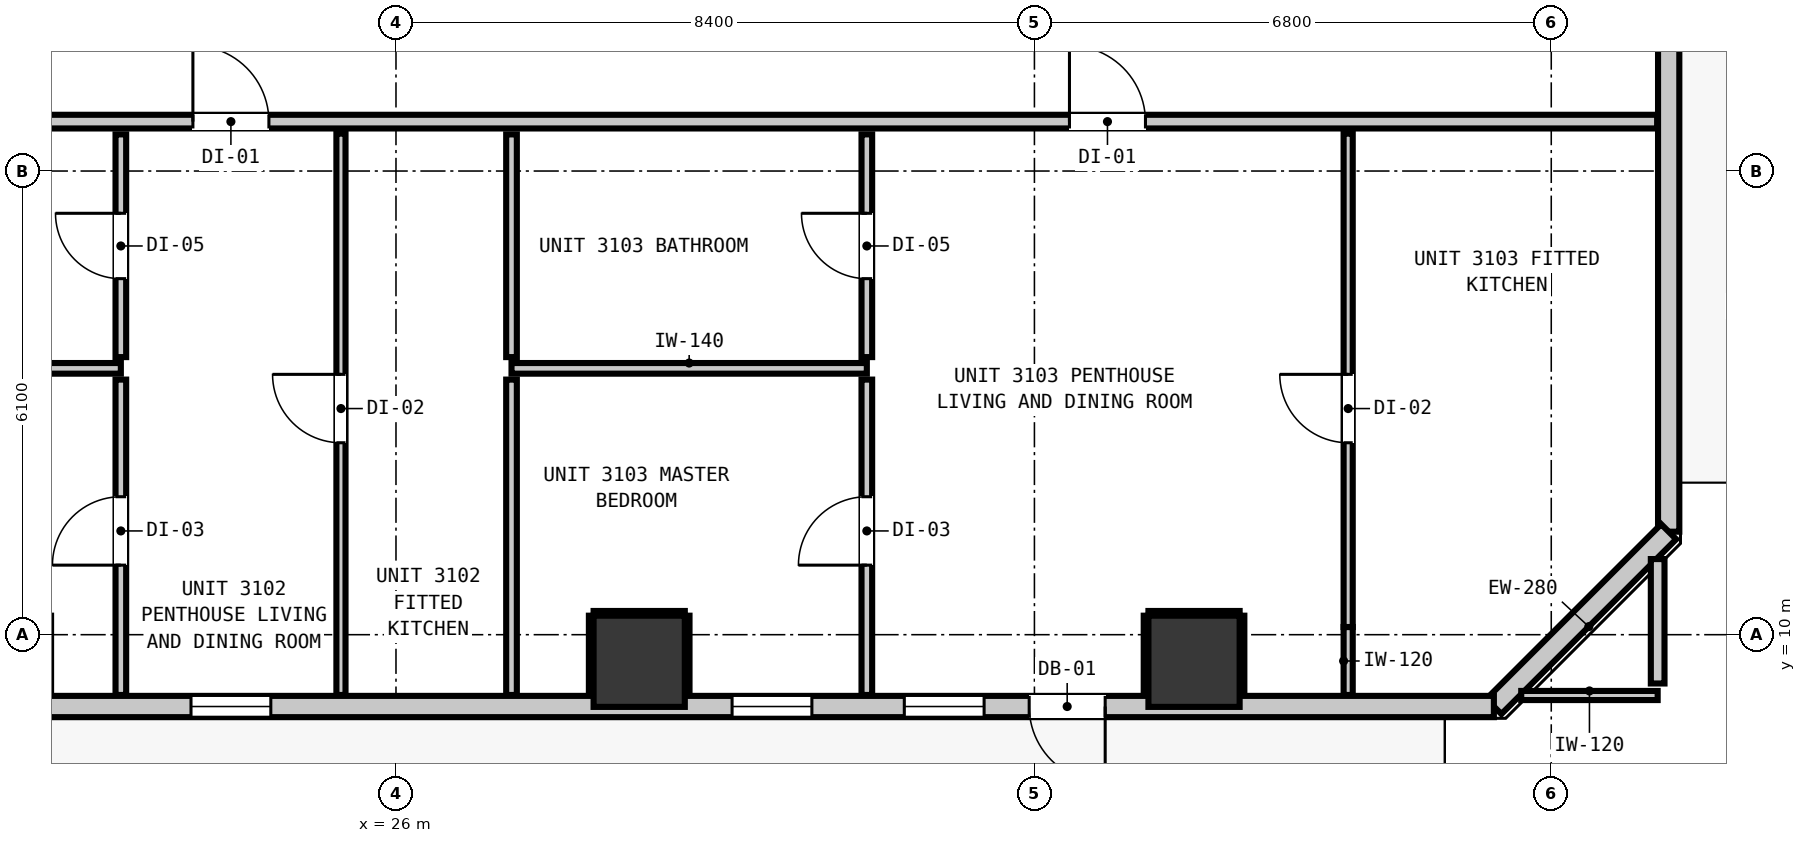
"""IFC4 building model, lengths in metres.
Left out: names, types, materials, properties, quantities, classifications, styles, units other than length and angle.
Written with IfcOpenShell. Run it as: python <this file> out.ifc"""

import sys

from ifc_helpers import new_model, si_unit, direction, frame, frame_2d, origin, origin_2d, place, context, subcontext, project, spatial, rectangle, extrude, element, fill, save


model = new_model("IFC4")
c1 = context("Model", 3, precision=1e-05, world=origin(), true_north=direction((0.0, 1.0)))
c2 = subcontext(c1, "Body", "Model", "MODEL_VIEW")
j1 = project(units=[si_unit("LENGTHUNIT", "METRE"), si_unit("PLANEANGLEUNIT", "RADIAN")], contexts=[c1])
p1 = place(None, origin())
s1 = spatial("IfcSite", under=j1, at=p1, CompositionType="ELEMENT")
p2 = place(p1, origin())
s2 = spatial("IfcBuilding", under=s1, at=p2, CompositionType="ELEMENT")
p3 = place(p2, frame((0.0, 0.0, 109.4)))
s3 = spatial("IfcBuildingStorey", under=s2, at=p3, CompositionType="ELEMENT", Elevation=109.4)
for number, where, z_axis, x_axis in (
    (1, (29.2, 9.65, 0.0), (0.0, 0.0, 1.0), (1.0, 0.0, 0.0)),
    (2, (36.5, 9.65, 0.0), (0.0, 0.0, 1.0), (1.0, 0.0, 0.0)),
):
    element("IfcColumn", number, at=place(p3, frame(where, z_axis=z_axis, x_axis=x_axis)), inside=s3, PredefinedType="COLUMN", context=c2, shape_type="SweptSolid", body=[
        extrude(rectangle(XDim=1.2, YDim=1.2, at=origin_2d()), origin(), (0.0, 0.0, 1.0), 3.32),
    ])
p4 = place(p3, frame((42.745, 43.645, 0.0), z_axis=(0.0, 0.0, 1.0), x_axis=(0.0, -1.0, 0.0)))
e3 = element("IfcWall", 3, at=p4, inside=s3, PredefinedType="STANDARD", context=c2, shape_type="SweptSolid", body=[
    extrude(rectangle(XDim=32.29, YDim=0.28, at=frame_2d((16.145, 0.0))), origin(), (0.0, 0.0, 1.0), 3.08),
])
p5 = place(p4, frame((6.871, 0.0, 0.0)))
e4 = element("IfcOpeningElement", 4, at=p5, cuts=e3, PredefinedType="OPENING", context=c2, shape_type="SweptSolid", body=[
    extrude(rectangle(XDim=1.0, YDim=2.15, at=frame_2d((0.5, 1.075))), frame((0.0, 0.15, 0.0), z_axis=(0.0, -1.0, 0.0), x_axis=(1.0, 0.0, 0.0)), (0.0, 0.0, 1.0), 0.3),
])
p6 = place(p4, frame((0.318, 0.0, 0.85)))
e5 = element("IfcOpeningElement", 5, at=p6, cuts=e3, PredefinedType="OPENING", context=c2, shape_type="SweptSolid", body=[
    extrude(rectangle(XDim=1.05, YDim=1.65, at=frame_2d((0.525, 0.825))), frame((0.0, 0.15, 0.0), z_axis=(0.0, -1.0, 0.0), x_axis=(1.0, 0.0, 0.0)), (0.0, 0.0, 1.0), 0.3),
])
p7 = place(p4, frame((16.37, 0.0, 0.85)))
e6 = element("IfcOpeningElement", 6, at=p7, cuts=e3, PredefinedType="OPENING", context=c2, shape_type="SweptSolid", body=[
    extrude(rectangle(XDim=2.7, YDim=2.0, at=frame_2d((1.35, 1.0))), frame((0.0, 0.15, 0.0), z_axis=(0.0, -1.0, 0.0), x_axis=(1.0, 0.0, 0.0)), (0.0, 0.0, 1.0), 0.3),
])
p8 = place(p4, frame((8.452, 0.0, 0.85)))
e7 = element("IfcOpeningElement", 7, at=p8, cuts=e3, PredefinedType="OPENING", context=c2, shape_type="SweptSolid", body=[
    extrude(rectangle(XDim=1.05, YDim=1.65, at=frame_2d((0.525, 0.825))), frame((0.0, 0.15, 0.0), z_axis=(0.0, -1.0, 0.0), x_axis=(1.0, 0.0, 0.0)), (0.0, 0.0, 1.0), 0.3),
])
p9 = place(p3, frame((42.745, 11.355, 0.0), z_axis=(0.0, 0.0, 1.0), x_axis=(-0.707106781187, -0.707106781187, 0.0)))
e8 = element("IfcWall", 8, at=p9, inside=s3, PredefinedType="STANDARD", context=c2, shape_type="SweptSolid", body=[
    extrude(rectangle(XDim=3.253, YDim=0.28, at=frame_2d((1.626, 0.0))), origin(), (0.0, 0.0, 1.0), 3.08),
])
p10 = place(p3, frame((40.445, 9.055, 0.0), z_axis=(0.0, 0.0, 1.0), x_axis=(-1.0, 0.0, 0.0)))
e9 = element("IfcWall", 9, at=p10, inside=s3, PredefinedType="STANDARD", context=c2, shape_type="SweptSolid", body=[
    extrude(rectangle(XDim=35.09, YDim=0.28, at=frame_2d((17.545, 0.0))), origin(), (0.0, 0.0, 1.0), 3.08),
])
p11 = place(p10, frame((5.114, 0.0, 0.0)))
e10 = element("IfcOpeningElement", 10, at=p11, cuts=e9, PredefinedType="OPENING", context=c2, shape_type="SweptSolid", body=[
    extrude(rectangle(XDim=1.0, YDim=2.15, at=frame_2d((0.5, 1.075))), frame((0.0, 0.15, 0.0), z_axis=(0.0, -1.0, 0.0), x_axis=(1.0, 0.0, 0.0)), (0.0, 0.0, 1.0), 0.3),
])
p12 = place(p10, frame((29.53, 0.0, 0.85)))
e11 = element("IfcOpeningElement", 11, at=p12, cuts=e9, PredefinedType="OPENING", context=c2, shape_type="SweptSolid", body=[
    extrude(rectangle(XDim=2.7, YDim=2.0, at=frame_2d((1.35, 1.0))), frame((0.0, 0.15, 0.0), z_axis=(0.0, -1.0, 0.0), x_axis=(1.0, 0.0, 0.0)), (0.0, 0.0, 1.0), 0.3),
])
p13 = place(p10, frame((33.593, 0.0, 0.85)))
e12 = element("IfcOpeningElement", 12, at=p13, cuts=e9, PredefinedType="OPENING", context=c2, shape_type="SweptSolid", body=[
    extrude(rectangle(XDim=1.05, YDim=1.65, at=frame_2d((0.525, 0.825))), frame((0.0, 0.15, 0.0), z_axis=(0.0, -1.0, 0.0), x_axis=(1.0, 0.0, 0.0)), (0.0, 0.0, 1.0), 0.3),
])
p14 = place(p10, frame((16.092, 0.0, 0.85)))
e13 = element("IfcOpeningElement", 13, at=p14, cuts=e9, PredefinedType="OPENING", context=c2, shape_type="SweptSolid", body=[
    extrude(rectangle(XDim=1.05, YDim=1.65, at=frame_2d((0.525, 0.825))), frame((0.0, 0.15, 0.0), z_axis=(0.0, -1.0, 0.0), x_axis=(1.0, 0.0, 0.0)), (0.0, 0.0, 1.0), 0.3),
])
p15 = place(p10, frame((20.718, 0.0, 0.85)))
e14 = element("IfcOpeningElement", 14, at=p15, cuts=e9, PredefinedType="OPENING", context=c2, shape_type="SweptSolid", body=[
    extrude(rectangle(XDim=2.7, YDim=2.0, at=frame_2d((1.35, 1.0))), frame((0.0, 0.15, 0.0), z_axis=(0.0, -1.0, 0.0), x_axis=(1.0, 0.0, 0.0)), (0.0, 0.0, 1.0), 0.3),
])
p16 = place(p10, frame((6.707, 0.0, 0.85)))
e15 = element("IfcOpeningElement", 15, at=p16, cuts=e9, PredefinedType="OPENING", context=c2, shape_type="SweptSolid", body=[
    extrude(rectangle(XDim=1.05, YDim=1.65, at=frame_2d((0.525, 0.825))), frame((0.0, 0.15, 0.0), z_axis=(0.0, -1.0, 0.0), x_axis=(1.0, 0.0, 0.0)), (0.0, 0.0, 1.0), 0.3),
])
p17 = place(p10, frame((8.973, 0.0, 0.85)))
e16 = element("IfcOpeningElement", 16, at=p17, cuts=e9, PredefinedType="OPENING", context=c2, shape_type="SweptSolid", body=[
    extrude(rectangle(XDim=1.05, YDim=1.65, at=frame_2d((0.525, 0.825))), frame((0.0, 0.15, 0.0), z_axis=(0.0, -1.0, 0.0), x_axis=(1.0, 0.0, 0.0)), (0.0, 0.0, 1.0), 0.3),
])
p18 = place(p3, frame((3.207, 16.75, 0.0), z_axis=(0.0, 0.0, 1.0), x_axis=(1.0, 0.0, 0.0)))
e17 = element("IfcWall", 17, at=p18, inside=s3, PredefinedType="PARTITIONING", context=c2, shape_type="SweptSolid", body=[
    extrude(rectangle(XDim=39.386, YDim=0.18, at=frame_2d((19.693, 0.0))), origin(), (0.0, 0.0, 1.0), 3.08),
])
p19 = place(p18, frame((5.858, 0.0, 0.0)))
e18 = element("IfcOpeningElement", 18, at=p19, cuts=e17, PredefinedType="OPENING", context=c2, shape_type="SweptSolid", body=[
    extrude(rectangle(XDim=1.0, YDim=2.15, at=frame_2d((0.5, 1.075))), frame((0.0, 0.1, 0.0), z_axis=(0.0, -1.0, 0.0), x_axis=(1.0, 0.0, 0.0)), (0.0, 0.0, 1.0), 0.2),
])
p20 = place(p18, frame((20.121, 0.0, 0.0)))
e19 = element("IfcOpeningElement", 19, at=p20, cuts=e17, PredefinedType="OPENING", context=c2, shape_type="SweptSolid", body=[
    extrude(rectangle(XDim=1.0, YDim=2.15, at=frame_2d((0.5, 1.075))), frame((0.0, 0.1, 0.0), z_axis=(0.0, -1.0, 0.0), x_axis=(1.0, 0.0, 0.0)), (0.0, 0.0, 1.0), 0.2),
])
p21 = place(p18, frame((31.654, 0.0, 0.0)))
e20 = element("IfcOpeningElement", 20, at=p21, cuts=e17, PredefinedType="OPENING", context=c2, shape_type="SweptSolid", body=[
    extrude(rectangle(XDim=1.0, YDim=2.15, at=frame_2d((0.5, 1.075))), frame((0.0, 0.1, 0.0), z_axis=(0.0, -1.0, 0.0), x_axis=(1.0, 0.0, 0.0)), (0.0, 0.0, 1.0), 0.2),
])
p22 = place(p3, frame((16.454, 13.504, 0.0), z_axis=(0.0, 0.0, 1.0), x_axis=(1.0, 0.0, 0.0)))
e21 = element("IfcWall", 21, at=p22, inside=s3, PredefinedType="PARTITIONING", context=c2, shape_type="SweptSolid", body=[
    extrude(rectangle(XDim=5.926, YDim=0.14, at=frame_2d((2.963, 0.0))), origin(), (0.0, 0.0, 1.0), 3.08),
])
p23 = place(p3, frame((27.52, 13.504, 0.0), z_axis=(0.0, 0.0, 1.0), x_axis=(1.0, 0.0, 0.0)))
e22 = element("IfcWall", 22, at=p23, inside=s3, PredefinedType="PARTITIONING", context=c2, shape_type="SweptSolid", body=[
    extrude(rectangle(XDim=4.675, YDim=0.14, at=frame_2d((2.337, 0.0))), origin(), (0.0, 0.0, 1.0), 3.08),
])
p24 = place(p3, frame((40.805, 9.2, 0.0), z_axis=(0.0, 0.0, 1.0), x_axis=(1.0, 0.0, 0.0)))
e23 = element("IfcWall", 23, at=p24, inside=s3, PredefinedType="PARTITIONING", context=c2, shape_type="SweptSolid", body=[
    extrude(rectangle(XDim=1.795, YDim=0.12, at=frame_2d((0.897, 0.0))), origin(), (0.0, 0.0, 1.0), 3.08),
])
p25 = place(p3, frame((42.6, 9.358, 0.0), z_axis=(0.0, 0.0, 1.0), x_axis=(0.0, 1.0, 0.0)))
e24 = element("IfcWall", 24, at=p25, inside=s3, PredefinedType="PARTITIONING", context=c2, shape_type="SweptSolid", body=[
    extrude(rectangle(XDim=1.637, YDim=0.18, at=frame_2d((0.819, 0.0))), origin(), (0.0, 0.0, 1.0), 3.08),
])
p26 = place(p3, frame((22.38, 9.207, 0.0), z_axis=(0.0, 0.0, 1.0), x_axis=(0.0, 1.0, 0.0)))
e25 = element("IfcWall", 25, at=p26, inside=s3, PredefinedType="PARTITIONING", context=c2, shape_type="SweptSolid", body=[
    extrude(rectangle(XDim=4.149, YDim=0.14, at=frame_2d((2.074, 0.0))), origin(), (0.0, 0.0, 1.0), 3.08),
])
p27 = place(p26, frame((1.708, 0.0, 0.0)))
e26 = element("IfcOpeningElement", 26, at=p27, cuts=e25, PredefinedType="OPENING", context=c2, shape_type="SweptSolid", body=[
    extrude(rectangle(XDim=0.9, YDim=2.1, at=frame_2d((0.45, 1.05))), frame((0.0, 0.08, 0.0), z_axis=(0.0, -1.0, 0.0), x_axis=(1.0, 0.0, 0.0)), (0.0, 0.0, 1.0), 0.16),
])
p28 = place(p3, frame((22.38, 13.652, 0.0), z_axis=(0.0, 0.0, 1.0), x_axis=(0.0, 1.0, 0.0)))
e27 = element("IfcWall", 27, at=p28, inside=s3, PredefinedType="PARTITIONING", context=c2, shape_type="SweptSolid", body=[
    extrude(rectangle(XDim=2.93, YDim=0.14, at=frame_2d((1.465, 0.0))), origin(), (0.0, 0.0, 1.0), 3.08),
])
p29 = place(p28, frame((1.032, 0.0, 0.0)))
e28 = element("IfcOpeningElement", 28, at=p29, cuts=e27, PredefinedType="OPENING", context=c2, shape_type="SweptSolid", body=[
    extrude(rectangle(XDim=0.86, YDim=2.02, at=frame_2d((0.43, 1.01))), frame((0.0, 0.08, 0.0), z_axis=(0.0, -1.0, 0.0), x_axis=(1.0, 0.0, 0.0)), (0.0, 0.0, 1.0), 0.16),
])
p30 = place(p3, frame((27.52, 9.207, 0.0), z_axis=(0.0, 0.0, 1.0), x_axis=(0.0, 1.0, 0.0)))
e29 = element("IfcWall", 29, at=p30, inside=s3, PredefinedType="PARTITIONING", context=c2, shape_type="SweptSolid", body=[
    extrude(rectangle(XDim=4.149, YDim=0.14, at=frame_2d((2.074, 0.0))), origin(), (0.0, 0.0, 1.0), 3.08),
])
p31 = place(p3, frame((27.52, 13.652, 0.0), z_axis=(0.0, 0.0, 1.0), x_axis=(0.0, 1.0, 0.0)))
e30 = element("IfcWall", 30, at=p31, inside=s3, PredefinedType="PARTITIONING", context=c2, shape_type="SweptSolid", body=[
    extrude(rectangle(XDim=2.93, YDim=0.14, at=frame_2d((1.465, 0.0))), origin(), (0.0, 0.0, 1.0), 3.08),
])
p32 = place(p3, frame((32.195, 9.207, 0.0), z_axis=(0.0, 0.0, 1.0), x_axis=(0.0, 1.0, 0.0)))
e31 = element("IfcWall", 31, at=p32, inside=s3, PredefinedType="PARTITIONING", context=c2, shape_type="SweptSolid", body=[
    extrude(rectangle(XDim=4.149, YDim=0.14, at=frame_2d((2.074, 0.0))), origin(), (0.0, 0.0, 1.0), 3.08),
])
p33 = place(p32, frame((1.708, 0.0, 0.0)))
e32 = element("IfcOpeningElement", 32, at=p33, cuts=e31, PredefinedType="OPENING", context=c2, shape_type="SweptSolid", body=[
    extrude(rectangle(XDim=0.9, YDim=2.1, at=frame_2d((0.45, 1.05))), frame((0.0, 0.08, 0.0), z_axis=(0.0, -1.0, 0.0), x_axis=(1.0, 0.0, 0.0)), (0.0, 0.0, 1.0), 0.16),
])
p34 = place(p3, frame((32.195, 13.652, 0.0), z_axis=(0.0, 0.0, 1.0), x_axis=(0.0, 1.0, 0.0)))
e33 = element("IfcWall", 33, at=p34, inside=s3, PredefinedType="PARTITIONING", context=c2, shape_type="SweptSolid", body=[
    extrude(rectangle(XDim=2.93, YDim=0.14, at=frame_2d((1.465, 0.0))), origin(), (0.0, 0.0, 1.0), 3.08),
])
p35 = place(p34, frame((1.032, 0.0, 0.0)))
e34 = element("IfcOpeningElement", 34, at=p35, cuts=e33, PredefinedType="OPENING", context=c2, shape_type="SweptSolid", body=[
    extrude(rectangle(XDim=0.86, YDim=2.02, at=frame_2d((0.43, 1.01))), frame((0.0, 0.08, 0.0), z_axis=(0.0, -1.0, 0.0), x_axis=(1.0, 0.0, 0.0)), (0.0, 0.0, 1.0), 0.16),
])
p36 = place(p3, frame((25.276, 9.207, 0.0), z_axis=(0.0, 0.0, 1.0), x_axis=(0.0, 1.0, 0.0)))
e35 = element("IfcWall", 35, at=p36, inside=s3, PredefinedType="PARTITIONING", context=c2, shape_type="SweptSolid", body=[
    extrude(rectangle(XDim=7.385, YDim=0.12, at=frame_2d((3.692, 0.0))), origin(), (0.0, 0.0, 1.0), 3.08),
])
p37 = place(p36, frame((3.318, 0.0, 0.0)))
e36 = element("IfcOpeningElement", 36, at=p37, cuts=e35, PredefinedType="OPENING", context=c2, shape_type="SweptSolid", body=[
    extrude(rectangle(XDim=0.9, YDim=2.1, at=frame_2d((0.45, 1.05))), frame((0.0, 0.07, 0.0), z_axis=(0.0, -1.0, 0.0), x_axis=(1.0, 0.0, 0.0)), (0.0, 0.0, 1.0), 0.14),
])
p38 = place(p3, frame((38.528, 9.207, 0.0), z_axis=(0.0, 0.0, 1.0), x_axis=(0.0, 1.0, 0.0)))
e37 = element("IfcWall", 37, at=p38, inside=s3, PredefinedType="PARTITIONING", context=c2, shape_type="SweptSolid", body=[
    extrude(rectangle(XDim=0.894, YDim=0.12, at=frame_2d((0.447, 0.0))), origin(), (0.0, 0.0, 1.0), 3.08),
])
p39 = place(p3, frame((38.528, 10.101, 0.0), z_axis=(0.0, 0.0, 1.0), x_axis=(0.0, 1.0, 0.0)))
e38 = element("IfcWall", 38, at=p39, inside=s3, PredefinedType="PARTITIONING", context=c2, shape_type="SweptSolid", body=[
    extrude(rectangle(XDim=6.491, YDim=0.12, at=frame_2d((3.246, 0.0))), origin(), (0.0, 0.0, 1.0), 2.565),
])
p40 = place(p39, frame((2.424, 0.0, 0.0)))
e39 = element("IfcOpeningElement", 39, at=p40, cuts=e38, PredefinedType="OPENING", context=c2, shape_type="SweptSolid", body=[
    extrude(rectangle(XDim=0.9, YDim=2.1, at=frame_2d((0.45, 1.05))), frame((0.0, 0.07, 0.0), z_axis=(0.0, -1.0, 0.0), x_axis=(1.0, 0.0, 0.0)), (0.0, 0.0, 1.0), 0.14),
])
p41 = place(p3, frame((28.6, 10.282, 0.0), z_axis=(0.0, 0.0, 1.0), x_axis=(1.0, 0.0, 0.0)))
e40 = element("IfcWall", 40, at=p41, inside=s3, PredefinedType="PARTITIONING", context=c2, shape_type="SweptSolid", body=[
    extrude(rectangle(XDim=1.2, YDim=0.06, at=frame_2d((0.6, 0.0))), origin(), (0.0, 0.0, 1.0), 1.45),
])
for number, where, z_axis, x_axis in (
    (41, (28.568, 9.21, 0.0), (0.0, 0.0, 1.0), (0.0, 1.0, 0.0)),
    (42, (29.832, 9.21, 0.0), (0.0, 0.0, 1.0), (0.0, 1.0, 0.0)),
):
    element("IfcWall", number, at=place(p3, frame(where, z_axis=z_axis, x_axis=x_axis)), inside=s3, PredefinedType="PARTITIONING", context=c2, shape_type="SweptSolid", body=[
        extrude(rectangle(XDim=1.04, YDim=0.06, at=frame_2d((0.52, 0.0))), origin(), (0.0, 0.0, 1.0), 1.45),
    ])
p42 = place(p3, frame((35.9, 10.282, 0.0), z_axis=(0.0, 0.0, 1.0), x_axis=(1.0, 0.0, 0.0)))
e43 = element("IfcWall", 43, at=p42, inside=s3, PredefinedType="PARTITIONING", context=c2, shape_type="SweptSolid", body=[
    extrude(rectangle(XDim=1.2, YDim=0.06, at=frame_2d((0.6, 0.0))), origin(), (0.0, 0.0, 1.0), 1.45),
])
for number, where, z_axis, x_axis in (
    (44, (35.868, 9.21, 0.0), (0.0, 0.0, 1.0), (0.0, 1.0, 0.0)),
    (45, (37.132, 9.21, 0.0), (0.0, 0.0, 1.0), (0.0, 1.0, 0.0)),
):
    element("IfcWall", number, at=place(p3, frame(where, z_axis=z_axis, x_axis=x_axis)), inside=s3, PredefinedType="PARTITIONING", context=c2, shape_type="SweptSolid", body=[
        extrude(rectangle(XDim=1.04, YDim=0.06, at=frame_2d((0.52, 0.0))), origin(), (0.0, 0.0, 1.0), 1.45),
    ])
p43 = place(p11, origin())
e46 = element("IfcDoor", 46, at=p43, inside=s3, OperationType="SINGLE_SWING_LEFT", PredefinedType="DOOR", context=c2, shape_type="SweptSolid", body=[
    extrude(rectangle(XDim=1.0, YDim=2.15, at=frame_2d((0.5, 1.075))), frame((0.0, 0.025, 0.0), z_axis=(0.0, -1.0, 0.0), x_axis=(1.0, 0.0, 0.0)), (0.0, 0.0, 1.0), 0.05),
])
fill(e10, e46)
p44 = place(p14, origin())
e47 = element("IfcWindow", 47, at=p44, inside=s3, PartitioningType="SINGLE_PANEL", PredefinedType="WINDOW", context=c2, shape_type="SweptSolid", body=[
    extrude(rectangle(XDim=1.05, YDim=1.65, at=frame_2d((0.525, 0.825))), frame((0.0, 0.03, 0.0), z_axis=(0.0, -1.0, 0.0), x_axis=(1.0, 0.0, 0.0)), (0.0, 0.0, 1.0), 0.06),
])
fill(e13, e47)
p45 = place(p16, origin())
e48 = element("IfcWindow", 48, at=p45, inside=s3, PartitioningType="SINGLE_PANEL", PredefinedType="WINDOW", context=c2, shape_type="SweptSolid", body=[
    extrude(rectangle(XDim=1.05, YDim=1.65, at=frame_2d((0.525, 0.825))), frame((0.0, 0.03, 0.0), z_axis=(0.0, -1.0, 0.0), x_axis=(1.0, 0.0, 0.0)), (0.0, 0.0, 1.0), 0.06),
])
fill(e15, e48)
p46 = place(p17, origin())
e49 = element("IfcWindow", 49, at=p46, inside=s3, PartitioningType="SINGLE_PANEL", PredefinedType="WINDOW", context=c2, shape_type="SweptSolid", body=[
    extrude(rectangle(XDim=1.05, YDim=1.65, at=frame_2d((0.525, 0.825))), frame((0.0, 0.03, 0.0), z_axis=(0.0, -1.0, 0.0), x_axis=(1.0, 0.0, 0.0)), (0.0, 0.0, 1.0), 0.06),
])
fill(e16, e49)
p47 = place(p20, origin())
e50 = element("IfcDoor", 50, at=p47, inside=s3, OperationType="SINGLE_SWING_LEFT", PredefinedType="DOOR", context=c2, shape_type="SweptSolid", body=[
    extrude(rectangle(XDim=1.0, YDim=2.15, at=frame_2d((0.5, 1.075))), frame((0.0, 0.025, 0.0), z_axis=(0.0, -1.0, 0.0), x_axis=(1.0, 0.0, 0.0)), (0.0, 0.0, 1.0), 0.05),
])
fill(e19, e50)
p48 = place(p29, origin())
e51 = element("IfcDoor", 51, at=p48, inside=s3, OperationType="SINGLE_SWING_RIGHT", PredefinedType="DOOR", context=c2, shape_type="SweptSolid", body=[
    extrude(rectangle(XDim=0.86, YDim=2.02, at=frame_2d((0.43, 1.01))), frame((0.0, 0.025, 0.0), z_axis=(0.0, -1.0, 0.0), x_axis=(1.0, 0.0, 0.0)), (0.0, 0.0, 1.0), 0.05),
])
fill(e28, e51)
p49 = place(p27, origin())
e52 = element("IfcDoor", 52, at=p49, inside=s3, OperationType="SINGLE_SWING_LEFT", PredefinedType="DOOR", context=c2, shape_type="SweptSolid", body=[
    extrude(rectangle(XDim=0.9, YDim=2.1, at=frame_2d((0.45, 1.05))), frame((0.0, 0.025, 0.0), z_axis=(0.0, -1.0, 0.0), x_axis=(1.0, 0.0, 0.0)), (0.0, 0.0, 1.0), 0.05),
])
fill(e26, e52)
p50 = place(p37, origin())
e53 = element("IfcDoor", 53, at=p50, inside=s3, OperationType="SINGLE_SWING_RIGHT", PredefinedType="DOOR", context=c2, shape_type="SweptSolid", body=[
    extrude(rectangle(XDim=0.9, YDim=2.1, at=frame_2d((0.45, 1.05))), frame((0.0, 0.025, 0.0), z_axis=(0.0, -1.0, 0.0), x_axis=(1.0, 0.0, 0.0)), (0.0, 0.0, 1.0), 0.05),
])
fill(e36, e53)
p51 = place(p21, origin())
e54 = element("IfcDoor", 54, at=p51, inside=s3, OperationType="SINGLE_SWING_LEFT", PredefinedType="DOOR", context=c2, shape_type="SweptSolid", body=[
    extrude(rectangle(XDim=1.0, YDim=2.15, at=frame_2d((0.5, 1.075))), frame((0.0, 0.025, 0.0), z_axis=(0.0, -1.0, 0.0), x_axis=(1.0, 0.0, 0.0)), (0.0, 0.0, 1.0), 0.05),
])
fill(e20, e54)
p52 = place(p35, origin())
e55 = element("IfcDoor", 55, at=p52, inside=s3, OperationType="SINGLE_SWING_RIGHT", PredefinedType="DOOR", context=c2, shape_type="SweptSolid", body=[
    extrude(rectangle(XDim=0.86, YDim=2.02, at=frame_2d((0.43, 1.01))), frame((0.0, 0.025, 0.0), z_axis=(0.0, -1.0, 0.0), x_axis=(1.0, 0.0, 0.0)), (0.0, 0.0, 1.0), 0.05),
])
fill(e34, e55)
p53 = place(p33, origin())
e56 = element("IfcDoor", 56, at=p53, inside=s3, OperationType="SINGLE_SWING_LEFT", PredefinedType="DOOR", context=c2, shape_type="SweptSolid", body=[
    extrude(rectangle(XDim=0.9, YDim=2.1, at=frame_2d((0.45, 1.05))), frame((0.0, 0.025, 0.0), z_axis=(0.0, -1.0, 0.0), x_axis=(1.0, 0.0, 0.0)), (0.0, 0.0, 1.0), 0.05),
])
fill(e32, e56)
p54 = place(p40, origin())
e57 = element("IfcDoor", 57, at=p54, inside=s3, OperationType="SINGLE_SWING_RIGHT", PredefinedType="DOOR", context=c2, shape_type="SweptSolid", body=[
    extrude(rectangle(XDim=0.9, YDim=2.1, at=frame_2d((0.45, 1.05))), frame((0.0, 0.025, 0.0), z_axis=(0.0, -1.0, 0.0), x_axis=(1.0, 0.0, 0.0)), (0.0, 0.0, 1.0), 0.05),
])
fill(e39, e57)
save(model, sys.argv[1])
